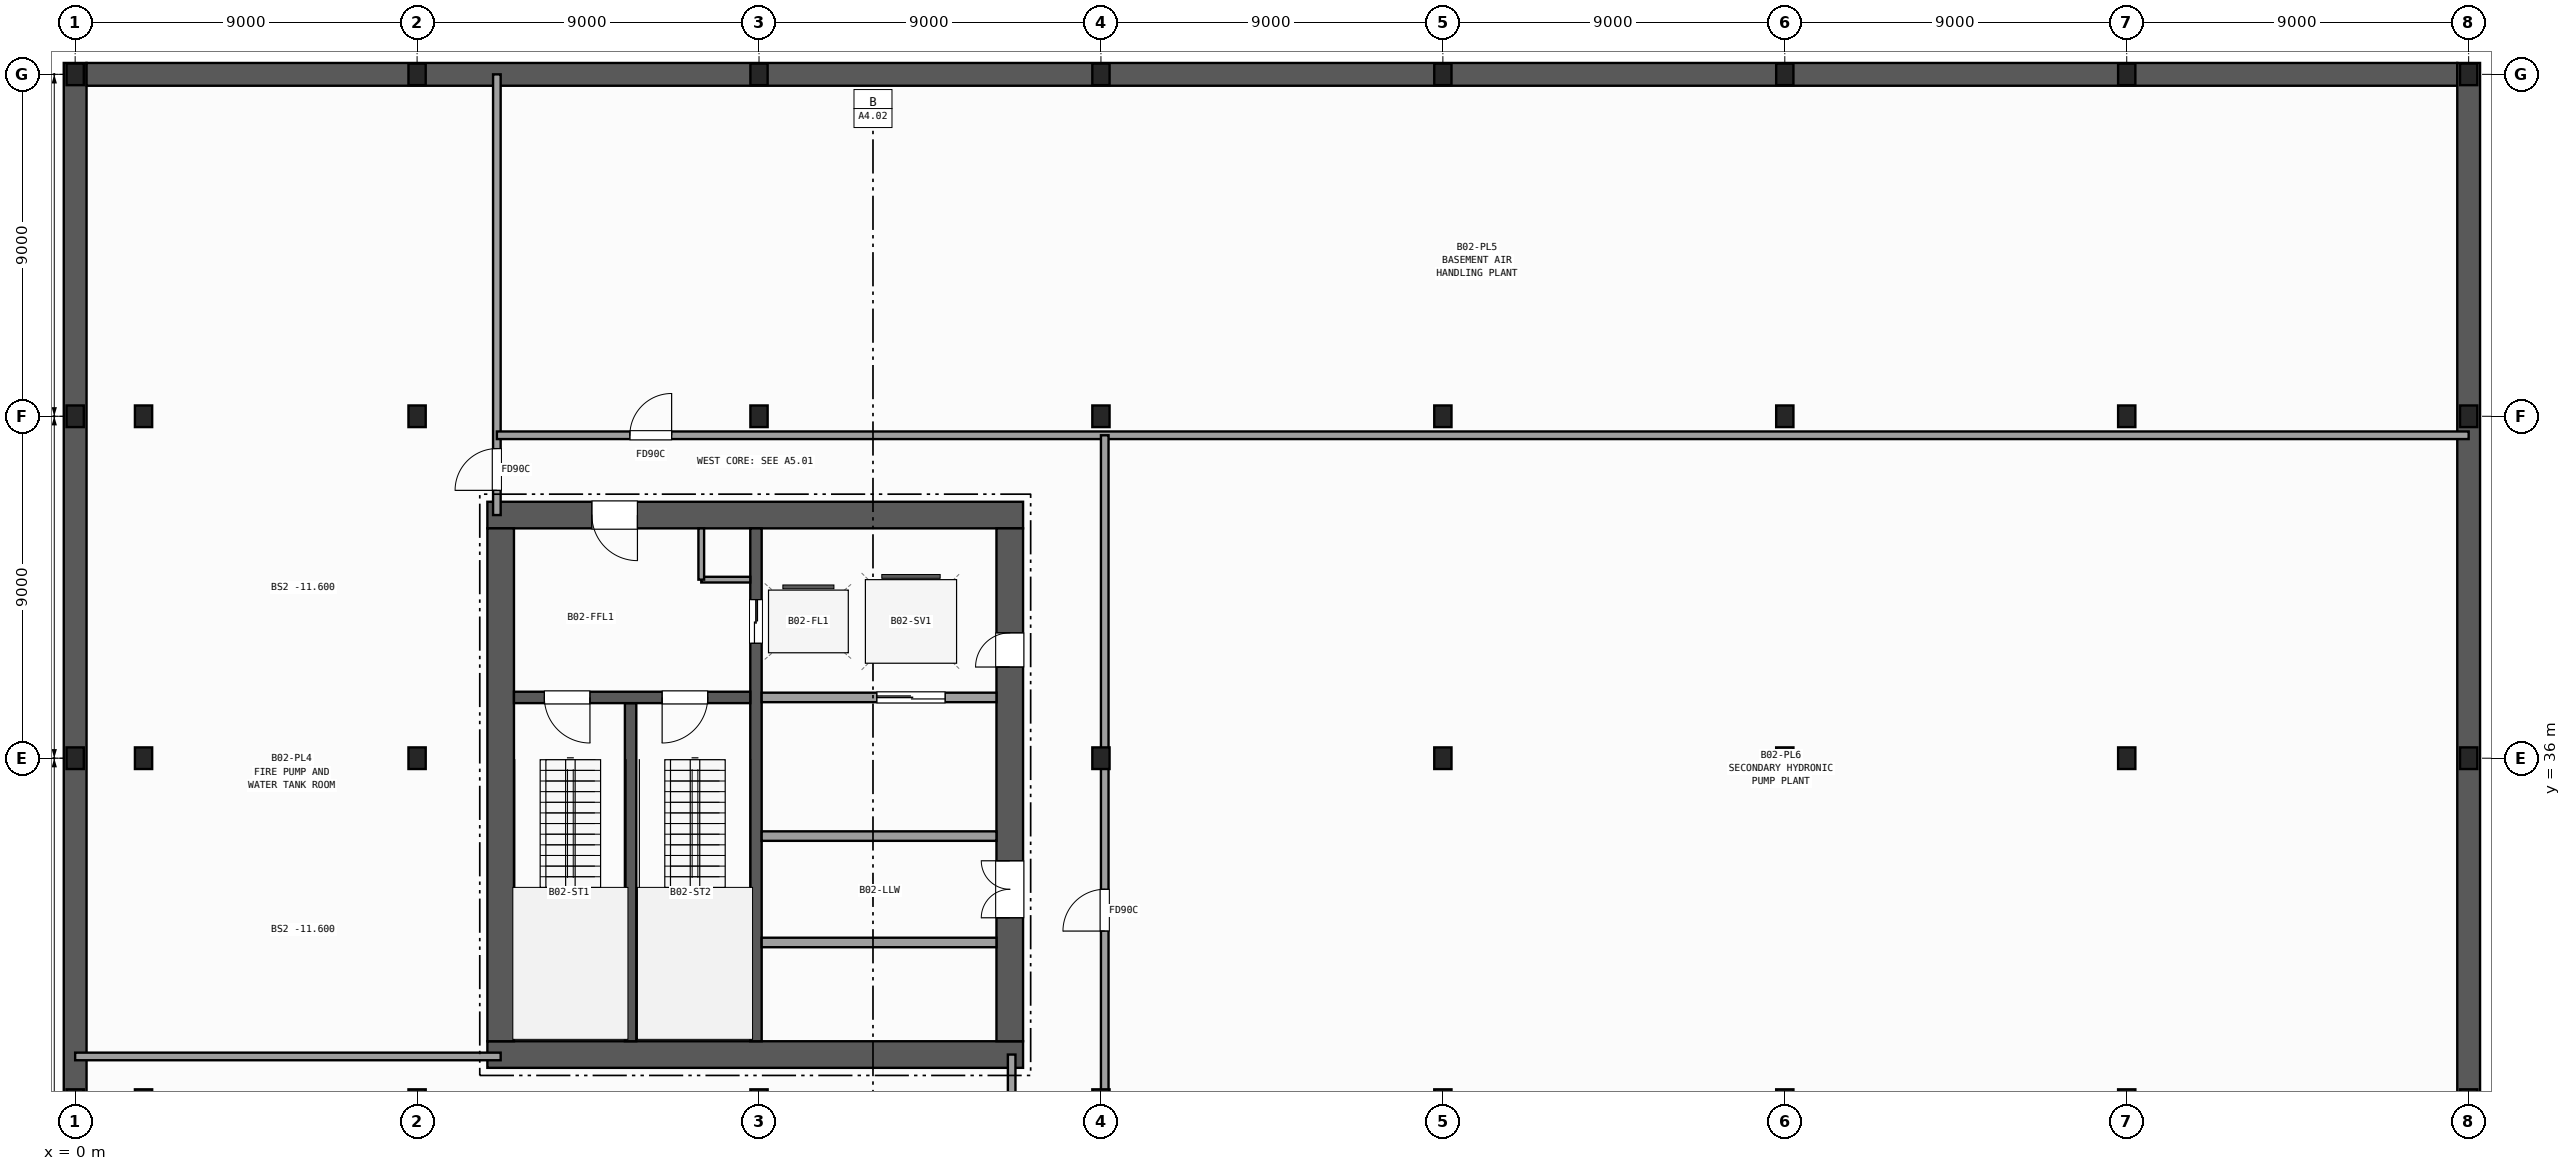
"""IFC4 building model, lengths in metres.
Left out: names, types, materials, properties, quantities, classifications, styles, units other than length and angle.
Written with IfcOpenShell. Run it as: python <this file> out.ifc"""

import sys

from ifc_helpers import new_model, si_unit, direction, frame, frame_2d, origin, origin_2d, place, context, subcontext, project, spatial, rectangle, i_section, extrude, element, fill, save


model = new_model("IFC4")
c1 = context("Model", 3, precision=1e-05, world=origin(), true_north=direction((0.0, 1.0)))
c2 = subcontext(c1, "Body", "Model", "MODEL_VIEW")
j1 = project(units=[si_unit("LENGTHUNIT", "METRE"), si_unit("PLANEANGLEUNIT", "RADIAN")], contexts=[c1])
p1 = place(None, origin())
s1 = spatial("IfcSite", under=j1, at=p1, CompositionType="ELEMENT")
p2 = place(p1, origin())
s2 = spatial("IfcBuilding", under=s1, at=p2, CompositionType="ELEMENT")
p3 = place(p2, frame((0.0, 0.0, -9.0)))
s3 = spatial("IfcBuildingStorey", under=s2, at=p3, CompositionType="ELEMENT", Elevation=-9.0)
for number, where, z_axis, x_axis in (
    (1, (0.0, 27.0, 0.0), (0.0, 0.0, 1.0), (1.0, 0.0, 0.0)),
    (2, (0.0, 36.0, 0.0), (0.0, 0.0, 1.0), (1.0, 0.0, 0.0)),
    (3, (0.0, 45.0, 0.0), (0.0, 0.0, 1.0), (1.0, 0.0, 0.0)),
    (4, (0.0, 54.0, 0.0), (0.0, 0.0, 1.0), (1.0, 0.0, 0.0)),
    (5, (9.0, 27.0, 0.0), (0.0, 0.0, 1.0), (1.0, 0.0, 0.0)),
    (6, (9.0, 36.0, 0.0), (0.0, 0.0, 1.0), (1.0, 0.0, 0.0)),
    (7, (9.0, 45.0, 0.0), (0.0, 0.0, 1.0), (1.0, 0.0, 0.0)),
    (8, (9.0, 54.0, 0.0), (0.0, 0.0, 1.0), (1.0, 0.0, 0.0)),
    (9, (18.0, 27.0, 0.0), (0.0, 0.0, 1.0), (1.0, 0.0, 0.0)),
    (10, (18.0, 45.0, 0.0), (0.0, 0.0, 1.0), (1.0, 0.0, 0.0)),
    (11, (18.0, 54.0, 0.0), (0.0, 0.0, 1.0), (1.0, 0.0, 0.0)),
    (12, (27.0, 27.0, 0.0), (0.0, 0.0, 1.0), (1.0, 0.0, 0.0)),
    (13, (27.0, 36.0, 0.0), (0.0, 0.0, 1.0), (1.0, 0.0, 0.0)),
    (14, (27.0, 45.0, 0.0), (0.0, 0.0, 1.0), (1.0, 0.0, 0.0)),
    (15, (27.0, 54.0, 0.0), (0.0, 0.0, 1.0), (1.0, 0.0, 0.0)),
    (16, (36.0, 27.0, 0.0), (0.0, 0.0, 1.0), (1.0, 0.0, 0.0)),
    (17, (36.0, 36.0, 0.0), (0.0, 0.0, 1.0), (1.0, 0.0, 0.0)),
    (18, (36.0, 45.0, 0.0), (0.0, 0.0, 1.0), (1.0, 0.0, 0.0)),
    (19, (36.0, 54.0, 0.0), (0.0, 0.0, 1.0), (1.0, 0.0, 0.0)),
    (20, (45.0, 27.0, 0.0), (0.0, 0.0, 1.0), (1.0, 0.0, 0.0)),
    (21, (45.0, 36.0, 0.0), (0.0, 0.0, 1.0), (1.0, 0.0, 0.0)),
    (22, (45.0, 45.0, 0.0), (0.0, 0.0, 1.0), (1.0, 0.0, 0.0)),
    (23, (45.0, 54.0, 0.0), (0.0, 0.0, 1.0), (1.0, 0.0, 0.0)),
    (24, (54.0, 27.0, 0.0), (0.0, 0.0, 1.0), (1.0, 0.0, 0.0)),
    (25, (54.0, 36.0, 0.0), (0.0, 0.0, 1.0), (1.0, 0.0, 0.0)),
    (26, (54.0, 45.0, 0.0), (0.0, 0.0, 1.0), (1.0, 0.0, 0.0)),
    (27, (54.0, 54.0, 0.0), (0.0, 0.0, 1.0), (1.0, 0.0, 0.0)),
    (28, (63.0, 27.0, 0.0), (0.0, 0.0, 1.0), (1.0, 0.0, 0.0)),
    (29, (63.0, 36.0, 0.0), (0.0, 0.0, 1.0), (1.0, 0.0, 0.0)),
    (30, (63.0, 45.0, 0.0), (0.0, 0.0, 1.0), (1.0, 0.0, 0.0)),
    (31, (63.0, 54.0, 0.0), (0.0, 0.0, 1.0), (1.0, 0.0, 0.0)),
    (32, (1.8, 27.0, 0.0), (0.0, 0.0, 1.0), (1.0, 0.0, 0.0)),
    (33, (1.8, 36.0, 0.0), (0.0, 0.0, 1.0), (1.0, 0.0, 0.0)),
    (34, (1.8, 45.0, 0.0), (0.0, 0.0, 1.0), (1.0, 0.0, 0.0)),
):
    element("IfcColumn", number, at=place(p3, frame(where, z_axis=z_axis, x_axis=x_axis)), inside=s3, PredefinedType="COLUMN", context=c2, shape_type="SweptSolid", body=[
        extrude(i_section(OverallWidth=0.454, OverallDepth=0.569, WebThickness=0.078, FlangeThickness=0.125, FilletRadius=0.015, at=origin_2d()), origin(), (0.0, 0.0, 1.0), 4.5),
    ])
p4 = place(p3, frame((0.0, -0.3, 0.0), z_axis=(0.0, 0.0, 1.0), x_axis=(0.0, 1.0, 0.0)))
e35 = element("IfcWall", 35, at=p4, inside=s3, PredefinedType="SOLIDWALL", context=c2, shape_type="SweptSolid", body=[
    extrude(rectangle(XDim=54.6, YDim=0.6, at=frame_2d((27.3, 0.0))), origin(), (0.0, 0.0, 1.0), 4.15),
])
p5 = place(p3, frame((0.3, 54.0, 0.0), z_axis=(0.0, 0.0, 1.0), x_axis=(1.0, 0.0, 0.0)))
e36 = element("IfcWall", 36, at=p5, inside=s3, PredefinedType="SOLIDWALL", context=c2, shape_type="SweptSolid", body=[
    extrude(rectangle(XDim=62.4, YDim=0.6, at=frame_2d((31.2, 0.0))), origin(), (0.0, 0.0, 1.0), 4.15),
])
p6 = place(p3, frame((63.0, 54.3, 0.0), z_axis=(0.0, 0.0, 1.0), x_axis=(0.0, -1.0, 0.0)))
e37 = element("IfcWall", 37, at=p6, inside=s3, PredefinedType="SOLIDWALL", context=c2, shape_type="SweptSolid", body=[
    extrude(rectangle(XDim=54.6, YDim=0.6, at=frame_2d((27.3, 0.0))), origin(), (0.0, 0.0, 1.0), 4.15),
])
p7 = place(p3, frame((10.85, 28.2, 0.0), z_axis=(0.0, 0.0, 1.0), x_axis=(1.0, 0.0, 0.0)))
e38 = element("IfcWall", 38, at=p7, inside=s3, PredefinedType="SHEAR", context=c2, shape_type="SweptSolid", body=[
    extrude(rectangle(XDim=14.1, YDim=0.7, at=frame_2d((7.05, 0.0))), origin(), (0.0, 0.0, 1.0), 4.15),
])
p8 = place(p3, frame((24.95, 42.4, 0.0), z_axis=(0.0, 0.0, 1.0), x_axis=(-1.0, 0.0, 0.0)))
e39 = element("IfcWall", 39, at=p8, inside=s3, PredefinedType="SHEAR", context=c2, shape_type="SweptSolid", body=[
    extrude(rectangle(XDim=14.1, YDim=0.7, at=frame_2d((7.05, 0.0))), origin(), (0.0, 0.0, 1.0), 4.15),
])
p9 = place(p8, frame((10.15, 0.0, 0.0)))
e40 = element("IfcOpeningElement", 40, at=p9, cuts=e39, PredefinedType="OPENING", context=c2, shape_type="SweptSolid", body=[
    extrude(rectangle(XDim=1.2, YDim=2.15, at=frame_2d((0.6, 1.075))), frame((0.0, 0.36, 0.0), z_axis=(0.0, -1.0, 0.0), x_axis=(1.0, 0.0, 0.0)), (0.0, 0.0, 1.0), 0.72),
])
p10 = place(p3, frame((11.2, 42.05, 0.0), z_axis=(0.0, 0.0, 1.0), x_axis=(0.0, -1.0, 0.0)))
e41 = element("IfcWall", 41, at=p10, inside=s3, PredefinedType="SHEAR", context=c2, shape_type="SweptSolid", body=[
    extrude(rectangle(XDim=13.5, YDim=0.7, at=frame_2d((6.75, 0.0))), origin(), (0.0, 0.0, 1.0), 4.15),
])
p11 = place(p3, frame((24.6, 28.55, 0.0), z_axis=(0.0, 0.0, 1.0), x_axis=(0.0, 1.0, 0.0)))
e42 = element("IfcWall", 42, at=p11, inside=s3, PredefinedType="SHEAR", context=c2, shape_type="SweptSolid", body=[
    extrude(rectangle(XDim=13.5, YDim=0.7, at=frame_2d((6.75, 0.0))), origin(), (0.0, 0.0, 1.0), 4.15),
])
p12 = place(p11, frame((3.25, 0.0, 0.0)))
e43 = element("IfcOpeningElement", 43, at=p12, cuts=e42, PredefinedType="OPENING", context=c2, shape_type="SweptSolid", body=[
    extrude(rectangle(XDim=1.5, YDim=2.2, at=frame_2d((0.75, 1.1))), frame((0.0, 0.36, 0.0), z_axis=(0.0, -1.0, 0.0), x_axis=(1.0, 0.0, 0.0)), (0.0, 0.0, 1.0), 0.72),
])
p13 = place(p11, frame((9.85, 0.0, 0.0)))
e44 = element("IfcOpeningElement", 44, at=p13, cuts=e42, PredefinedType="OPENING", context=c2, shape_type="SweptSolid", body=[
    extrude(rectangle(XDim=0.9, YDim=2.1, at=frame_2d((0.45, 1.05))), frame((0.0, 0.36, 0.0), z_axis=(0.0, -1.0, 0.0), x_axis=(1.0, 0.0, 0.0)), (0.0, 0.0, 1.0), 0.72),
])
p14 = place(p3, frame((14.62, 28.55, 0.0), z_axis=(0.0, 0.0, 1.0), x_axis=(0.0, 1.0, 0.0)))
e45 = element("IfcWall", 45, at=p14, inside=s3, PredefinedType="SHEAR", context=c2, shape_type="SweptSolid", body=[
    extrude(rectangle(XDim=8.9, YDim=0.3, at=frame_2d((4.45, 0.0))), origin(), (0.0, 0.0, 1.0), 4.15),
])
p15 = place(p3, frame((17.92, 42.05, 0.0), z_axis=(0.0, 0.0, 1.0), x_axis=(0.0, -1.0, 0.0)))
e46 = element("IfcWall", 46, at=p15, inside=s3, PredefinedType="SHEAR", context=c2, shape_type="SweptSolid", body=[
    extrude(rectangle(XDim=13.5, YDim=0.3, at=frame_2d((6.75, 0.0))), origin(), (0.0, 0.0, 1.0), 4.15),
])
p16 = place(p15, frame((1.875, 0.0, 0.0)))
e47 = element("IfcOpeningElement", 47, at=p16, cuts=e46, PredefinedType="OPENING", context=c2, shape_type="SweptSolid", body=[
    extrude(rectangle(XDim=1.15, YDim=2.15, at=frame_2d((0.575, 1.075))), frame((0.0, 0.16, 0.0), z_axis=(0.0, -1.0, 0.0), x_axis=(1.0, 0.0, 0.0)), (0.0, 0.0, 1.0), 0.32),
])
p17 = place(p3, frame((17.77, 37.6, 0.0), z_axis=(0.0, 0.0, 1.0), x_axis=(-1.0, 0.0, 0.0)))
e48 = element("IfcWall", 48, at=p17, inside=s3, PredefinedType="SHEAR", context=c2, shape_type="SweptSolid", body=[
    extrude(rectangle(XDim=6.22, YDim=0.3, at=frame_2d((3.11, 0.0))), origin(), (0.0, 0.0, 1.0), 4.15),
])
p18 = place(p17, frame((4.22, 0.0, 0.0)))
e49 = element("IfcOpeningElement", 49, at=p18, cuts=e48, PredefinedType="OPENING", context=c2, shape_type="SweptSolid", body=[
    extrude(rectangle(XDim=1.2, YDim=2.15, at=frame_2d((0.6, 1.075))), frame((0.0, 0.16, 0.0), z_axis=(0.0, -1.0, 0.0), x_axis=(1.0, 0.0, 0.0)), (0.0, 0.0, 1.0), 0.32),
])
p19 = place(p17, frame((1.12, 0.0, 0.0)))
e50 = element("IfcOpeningElement", 50, at=p19, cuts=e48, PredefinedType="OPENING", context=c2, shape_type="SweptSolid", body=[
    extrude(rectangle(XDim=1.2, YDim=2.15, at=frame_2d((0.6, 1.075))), frame((0.0, 0.16, 0.0), z_axis=(0.0, -1.0, 0.0), x_axis=(1.0, 0.0, 0.0)), (0.0, 0.0, 1.0), 0.32),
])
p20 = place(p3, frame((16.48, 40.7, 0.0), z_axis=(0.0, 0.0, 1.0), x_axis=(1.0, 0.0, 0.0)))
e51 = element("IfcWall", 51, at=p20, inside=s3, PredefinedType="PARTITIONING", context=c2, shape_type="SweptSolid", body=[
    extrude(rectangle(XDim=1.29, YDim=0.15, at=frame_2d((0.645, 0.0))), origin(), (0.0, 0.0, 1.0), 4.15),
])
p21 = place(p3, frame((16.48, 40.7, 0.0), z_axis=(0.0, 0.0, 1.0), x_axis=(0.0, 1.0, 0.0)))
e52 = element("IfcWall", 52, at=p21, inside=s3, PredefinedType="PARTITIONING", context=c2, shape_type="SweptSolid", body=[
    extrude(rectangle(XDim=1.35, YDim=0.15, at=frame_2d((0.675, 0.0))), origin(), (0.0, 0.0, 1.0), 4.15),
])
p22 = place(p3, frame((18.07, 37.6, 0.0), z_axis=(0.0, 0.0, 1.0), x_axis=(1.0, 0.0, 0.0)))
e53 = element("IfcWall", 53, at=p22, inside=s3, PredefinedType="PARTITIONING", context=c2, shape_type="SweptSolid", body=[
    extrude(rectangle(XDim=6.18, YDim=0.25, at=frame_2d((3.09, 0.0))), origin(), (0.0, 0.0, 1.0), 4.15),
])
p23 = place(p22, frame((3.03, 0.0, 0.0)))
e54 = element("IfcOpeningElement", 54, at=p23, cuts=e53, PredefinedType="OPENING", context=c2, shape_type="SweptSolid", body=[
    extrude(rectangle(XDim=1.8, YDim=2.3, at=frame_2d((0.9, 1.15))), frame((0.0, 0.135, 0.0), z_axis=(0.0, -1.0, 0.0), x_axis=(1.0, 0.0, 0.0)), (0.0, 0.0, 1.0), 0.27),
])
for number, where, z_axis, x_axis in (
    (55, (18.07, 31.15, 0.0), (0.0, 0.0, 1.0), (1.0, 0.0, 0.0)),
    (56, (24.25, 33.95, 0.0), (0.0, 0.0, 1.0), (-1.0, 0.0, 0.0)),
):
    element("IfcWall", number, at=place(p3, frame(where, z_axis=z_axis, x_axis=x_axis)), inside=s3, PredefinedType="PARTITIONING", context=c2, shape_type="SweptSolid", body=[
        extrude(rectangle(XDim=6.18, YDim=0.25, at=frame_2d((3.09, 0.0))), origin(), (0.0, 0.0, 1.0), 4.15),
    ])
p24 = place(p3, frame((24.65, 0.0, 0.0), z_axis=(0.0, 0.0, 1.0), x_axis=(0.0, 1.0, 0.0)))
e57 = element("IfcWall", 57, at=p24, inside=s3, PredefinedType="PARTITIONING", context=c2, shape_type="SweptSolid", body=[
    extrude(rectangle(XDim=28.2, YDim=0.2, at=frame_2d((14.1, 0.0))), origin(), (0.0, 0.0, 1.0), 3.203),
])
p25 = place(p24, frame((13.0, 0.0, 0.0)))
e58 = element("IfcOpeningElement", 58, at=p25, cuts=e57, PredefinedType="OPENING", context=c2, shape_type="SweptSolid", body=[
    extrude(rectangle(XDim=1.1, YDim=2.15, at=frame_2d((0.55, 1.075))), frame((0.0, 0.11, 0.0), z_axis=(0.0, -1.0, 0.0), x_axis=(1.0, 0.0, 0.0)), (0.0, 0.0, 1.0), 0.22),
])
p26 = place(p3, frame((0.0, 28.15, 0.0), z_axis=(0.0, 0.0, 1.0), x_axis=(1.0, 0.0, 0.0)))
e59 = element("IfcWall", 59, at=p26, inside=s3, PredefinedType="PARTITIONING", context=c2, shape_type="SweptSolid", body=[
    extrude(rectangle(XDim=11.2, YDim=0.2, at=frame_2d((5.6, 0.0))), origin(), (0.0, 0.0, 1.0), 3.275),
])
p27 = place(p3, frame((11.1, 42.4, 0.0), z_axis=(0.0, 0.0, 1.0), x_axis=(0.0, 1.0, 0.0)))
e60 = element("IfcWall", 60, at=p27, inside=s3, PredefinedType="PARTITIONING", context=c2, shape_type="SweptSolid", body=[
    extrude(rectangle(XDim=11.6, YDim=0.2, at=frame_2d((5.8, 0.0))), origin(), (0.0, 0.0, 1.0), 3.203),
])
p28 = place(p27, frame((0.65, 0.0, 0.0)))
e61 = element("IfcOpeningElement", 61, at=p28, cuts=e60, PredefinedType="OPENING", context=c2, shape_type="SweptSolid", body=[
    extrude(rectangle(XDim=1.1, YDim=2.15, at=frame_2d((0.55, 1.075))), frame((0.0, 0.11, 0.0), z_axis=(0.0, -1.0, 0.0), x_axis=(1.0, 0.0, 0.0)), (0.0, 0.0, 1.0), 0.22),
])
p29 = place(p3, frame((11.1, 44.5, 0.0), z_axis=(0.0, 0.0, 1.0), x_axis=(1.0, 0.0, 0.0)))
e62 = element("IfcWall", 62, at=p29, inside=s3, PredefinedType="PARTITIONING", context=c2, shape_type="SweptSolid", body=[
    extrude(rectangle(XDim=51.9, YDim=0.2, at=frame_2d((25.95, 0.0))), origin(), (0.0, 0.0, 1.0), 3.275),
])
p30 = place(p29, frame((3.5, 0.0, 0.0)))
e63 = element("IfcOpeningElement", 63, at=p30, cuts=e62, PredefinedType="OPENING", context=c2, shape_type="SweptSolid", body=[
    extrude(rectangle(XDim=1.1, YDim=2.15, at=frame_2d((0.55, 1.075))), frame((0.0, 0.11, 0.0), z_axis=(0.0, -1.0, 0.0), x_axis=(1.0, 0.0, 0.0)), (0.0, 0.0, 1.0), 0.22),
])
p31 = place(p3, frame((27.1, 26.95, 0.0), z_axis=(0.0, 0.0, 1.0), x_axis=(0.0, 1.0, 0.0)))
e64 = element("IfcWall", 64, at=p31, inside=s3, PredefinedType="PARTITIONING", context=c2, shape_type="SweptSolid", body=[
    extrude(rectangle(XDim=17.55, YDim=0.2, at=frame_2d((8.775, 0.0))), origin(), (0.0, 0.0, 1.0), 3.203),
])
p32 = place(p31, frame((4.5, 0.0, 0.0)))
e65 = element("IfcOpeningElement", 65, at=p32, cuts=e64, PredefinedType="OPENING", context=c2, shape_type="SweptSolid", body=[
    extrude(rectangle(XDim=1.1, YDim=2.15, at=frame_2d((0.55, 1.075))), frame((0.0, 0.11, 0.0), z_axis=(0.0, -1.0, 0.0), x_axis=(1.0, 0.0, 0.0)), (0.0, 0.0, 1.0), 0.22),
])
p33 = place(p18, origin())
e66 = element("IfcDoor", 66, at=p33, inside=s3, OperationType="SINGLE_SWING_LEFT", PredefinedType="DOOR", context=c2, shape_type="SweptSolid", body=[
    extrude(rectangle(XDim=1.2, YDim=2.15, at=frame_2d((0.6, 1.075))), frame((0.0, 0.025, 0.0), z_axis=(0.0, -1.0, 0.0), x_axis=(1.0, 0.0, 0.0)), (0.0, 0.0, 1.0), 0.05),
])
fill(e49, e66)
p34 = place(p19, origin())
e67 = element("IfcDoor", 67, at=p34, inside=s3, OperationType="SINGLE_SWING_RIGHT", PredefinedType="DOOR", context=c2, shape_type="SweptSolid", body=[
    extrude(rectangle(XDim=1.2, YDim=2.15, at=frame_2d((0.6, 1.075))), frame((0.0, 0.025, 0.0), z_axis=(0.0, -1.0, 0.0), x_axis=(1.0, 0.0, 0.0)), (0.0, 0.0, 1.0), 0.05),
])
fill(e50, e67)
p35 = place(p12, origin())
e68 = element("IfcDoor", 68, at=p35, inside=s3, OperationType="DOUBLE_DOOR_SINGLE_SWING", PredefinedType="DOOR", context=c2, shape_type="SweptSolid", body=[
    extrude(rectangle(XDim=1.5, YDim=2.2, at=frame_2d((0.75, 1.1))), frame((0.0, 0.025, 0.0), z_axis=(0.0, -1.0, 0.0), x_axis=(1.0, 0.0, 0.0)), (0.0, 0.0, 1.0), 0.05),
])
fill(e43, e68)
p36 = place(p9, origin())
e69 = element("IfcDoor", 69, at=p36, inside=s3, OperationType="SINGLE_SWING_LEFT", PredefinedType="DOOR", context=c2, shape_type="SweptSolid", body=[
    extrude(rectangle(XDim=1.2, YDim=2.15, at=frame_2d((0.6, 1.075))), frame((0.0, 0.025, 0.0), z_axis=(0.0, -1.0, 0.0), x_axis=(1.0, 0.0, 0.0)), (0.0, 0.0, 1.0), 0.05),
])
fill(e40, e69)
p37 = place(p13, origin())
e70 = element("IfcDoor", 70, at=p37, inside=s3, OperationType="SINGLE_SWING_LEFT", PredefinedType="DOOR", context=c2, shape_type="SweptSolid", body=[
    extrude(rectangle(XDim=0.9, YDim=2.1, at=frame_2d((0.45, 1.05))), frame((0.0, 0.025, 0.0), z_axis=(0.0, -1.0, 0.0), x_axis=(1.0, 0.0, 0.0)), (0.0, 0.0, 1.0), 0.05),
])
fill(e44, e70)
p38 = place(p16, origin())
e71 = element("IfcDoor", 71, at=p38, inside=s3, OperationType="DOUBLE_DOOR_SLIDING", PredefinedType="DOOR", context=c2, shape_type="SweptSolid", body=[
    extrude(rectangle(XDim=1.15, YDim=2.15, at=frame_2d((0.575, 1.075))), frame((0.0, 0.025, 0.0), z_axis=(0.0, -1.0, 0.0), x_axis=(1.0, 0.0, 0.0)), (0.0, 0.0, 1.0), 0.05),
])
fill(e47, e71)
p39 = place(p23, origin())
e72 = element("IfcDoor", 72, at=p39, inside=s3, OperationType="DOUBLE_DOOR_SLIDING", PredefinedType="DOOR", context=c2, shape_type="SweptSolid", body=[
    extrude(rectangle(XDim=1.8, YDim=2.3, at=frame_2d((0.9, 1.15))), frame((0.0, 0.025, 0.0), z_axis=(0.0, -1.0, 0.0), x_axis=(1.0, 0.0, 0.0)), (0.0, 0.0, 1.0), 0.05),
])
fill(e54, e72)
p40 = place(p28, origin())
e73 = element("IfcDoor", 73, at=p40, inside=s3, OperationType="SINGLE_SWING_LEFT", PredefinedType="DOOR", context=c2, shape_type="SweptSolid", body=[
    extrude(rectangle(XDim=1.1, YDim=2.15, at=frame_2d((0.55, 1.075))), frame((0.0, 0.025, 0.0), z_axis=(0.0, -1.0, 0.0), x_axis=(1.0, 0.0, 0.0)), (0.0, 0.0, 1.0), 0.05),
])
fill(e61, e73)
p41 = place(p30, origin())
e74 = element("IfcDoor", 74, at=p41, inside=s3, OperationType="SINGLE_SWING_RIGHT", PredefinedType="DOOR", context=c2, shape_type="SweptSolid", body=[
    extrude(rectangle(XDim=1.1, YDim=2.15, at=frame_2d((0.55, 1.075))), frame((0.0, 0.025, 0.0), z_axis=(0.0, -1.0, 0.0), x_axis=(1.0, 0.0, 0.0)), (0.0, 0.0, 1.0), 0.05),
])
fill(e63, e74)
p42 = place(p32, origin())
e75 = element("IfcDoor", 75, at=p42, inside=s3, OperationType="SINGLE_SWING_LEFT", PredefinedType="DOOR", context=c2, shape_type="SweptSolid", body=[
    extrude(rectangle(XDim=1.1, YDim=2.15, at=frame_2d((0.55, 1.075))), frame((0.0, 0.025, 0.0), z_axis=(0.0, -1.0, 0.0), x_axis=(1.0, 0.0, 0.0)), (0.0, 0.0, 1.0), 0.05),
])
fill(e65, e75)
save(model, sys.argv[1])
